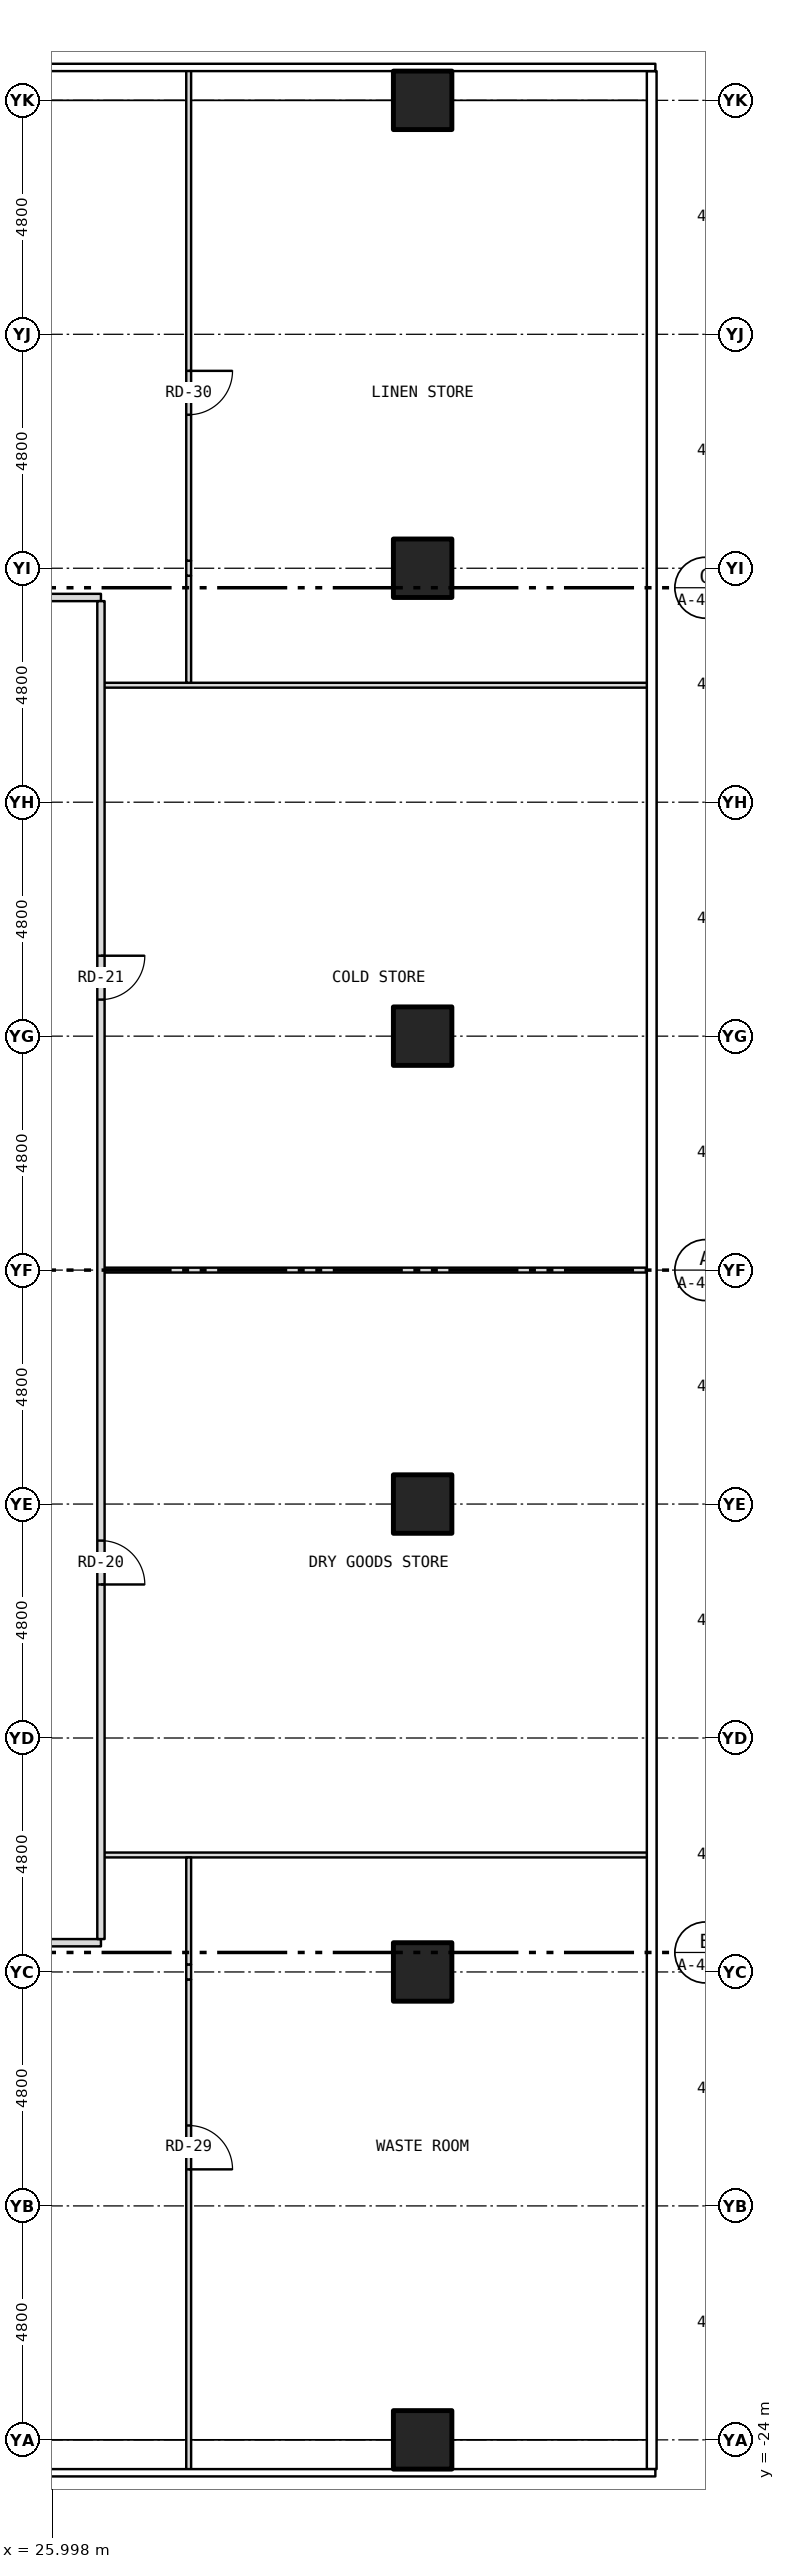
"""IFC4 building model, lengths in metres.
Left out: names, types, materials, properties, quantities, classifications, styles, units other than length and angle.
Written with IfcOpenShell. Run it as: python <this file> out.ifc"""

import sys

from ifc_helpers import new_model, si_unit, direction, frame, frame_2d, origin, origin_2d, place, context, subcontext, project, spatial, rectangle, hollow_rectangle, extrude, element, fill, save


model = new_model("IFC4")
c1 = context("Model", 3, precision=1e-05, world=origin(), true_north=direction((0.0, 1.0)))
c2 = subcontext(c1, "Body", "Model", "MODEL_VIEW")
j1 = project(units=[si_unit("LENGTHUNIT", "METRE"), si_unit("PLANEANGLEUNIT", "RADIAN")], contexts=[c1])
p1 = place(None, origin())
s1 = spatial("IfcSite", under=j1, at=p1, CompositionType="ELEMENT")
p2 = place(p1, origin())
s2 = spatial("IfcBuilding", under=s1, at=p2, CompositionType="ELEMENT")
p3 = place(p2, frame((0.0, 0.0, 29.0)))
s3 = spatial("IfcBuildingStorey", under=s2, at=p3, CompositionType="ELEMENT", Elevation=29.0)
for number, where, z_axis, x_axis in (
    (1, (33.6, -24.0, -0.2), (0.0, 0.0, 1.0), (1.0, 0.0, 0.0)),
    (2, (33.6, -14.4, -0.2), (0.0, 0.0, 1.0), (1.0, 0.0, 0.0)),
    (3, (33.6, -4.8, -0.2), (0.0, 0.0, 1.0), (1.0, 0.0, 0.0)),
    (4, (33.6, 4.8, -0.2), (0.0, 0.0, 1.0), (1.0, 0.0, 0.0)),
    (5, (33.6, 14.4, -0.2), (0.0, 0.0, 1.0), (1.0, 0.0, 0.0)),
    (6, (33.6, 24.0, -0.2), (0.0, 0.0, 1.0), (1.0, 0.0, 0.0)),
):
    element("IfcColumn", number, at=place(p3, frame(where, z_axis=z_axis, x_axis=x_axis)), inside=s3, PredefinedType="COLUMN", context=c2, shape_type="SweptSolid", body=[
        extrude(hollow_rectangle(XDim=1.2, YDim=1.2, WallThickness=0.07, at=origin_2d()), origin(), (0.0, 0.0, 1.0), 4.4),
    ])
p4 = place(p3, frame((-27.0, -13.8, 0.0), z_axis=(0.0, 0.0, 1.0), x_axis=(1.0, 0.0, 0.0)))
e7 = element("IfcWall", 7, at=p4, inside=s3, PredefinedType="PARTITIONING", context=c2, shape_type="SweptSolid", body=[
    extrude(rectangle(XDim=54.0, YDim=0.15, at=frame_2d((27.0, 0.0))), origin(), (0.0, 0.0, 1.0), 4.2),
])
p5 = place(p4, frame((37.83, 0.0, 0.0)))
e8 = element("IfcOpeningElement", 8, at=p5, cuts=e7, PredefinedType="OPENING", context=c2, shape_type="SweptSolid", body=[
    extrude(rectangle(XDim=0.9, YDim=2.1, at=frame_2d((0.45, 1.05))), frame((0.0, 0.087, 0.0), z_axis=(0.0, -1.0, 0.0), x_axis=(1.0, 0.0, 0.0)), (0.0, 0.0, 1.0), 0.174),
])
p6 = place(p4, frame((39.88, 0.0, 0.0)))
e9 = element("IfcOpeningElement", 9, at=p6, cuts=e7, PredefinedType="OPENING", context=c2, shape_type="SweptSolid", body=[
    extrude(rectangle(XDim=0.9, YDim=2.1, at=frame_2d((0.45, 1.05))), frame((0.0, 0.087, 0.0), z_axis=(0.0, -1.0, 0.0), x_axis=(1.0, 0.0, 0.0)), (0.0, 0.0, 1.0), 0.174),
])
p7 = place(p4, frame((43.75, 0.0, 0.0)))
e10 = element("IfcOpeningElement", 10, at=p7, cuts=e7, PredefinedType="OPENING", context=c2, shape_type="SweptSolid", body=[
    extrude(rectangle(XDim=0.9, YDim=2.1, at=frame_2d((0.45, 1.05))), frame((0.0, 0.087, 0.0), z_axis=(0.0, -1.0, 0.0), x_axis=(1.0, 0.0, 0.0)), (0.0, 0.0, 1.0), 0.174),
])
p8 = place(p4, frame((9.801, 0.0, 0.0)))
e11 = element("IfcOpeningElement", 11, at=p8, cuts=e7, PredefinedType="OPENING", context=c2, shape_type="SweptSolid", body=[
    extrude(rectangle(XDim=0.9, YDim=2.1, at=frame_2d((0.45, 1.05))), frame((0.0, 0.087, 0.0), z_axis=(0.0, -1.0, 0.0), x_axis=(1.0, 0.0, 0.0)), (0.0, 0.0, 1.0), 0.174),
])
p9 = place(p4, frame((14.601, 0.0, 0.0)))
e12 = element("IfcOpeningElement", 12, at=p9, cuts=e7, PredefinedType="OPENING", context=c2, shape_type="SweptSolid", body=[
    extrude(rectangle(XDim=0.9, YDim=2.1, at=frame_2d((0.45, 1.05))), frame((0.0, 0.087, 0.0), z_axis=(0.0, -1.0, 0.0), x_axis=(1.0, 0.0, 0.0)), (0.0, 0.0, 1.0), 0.174),
])
p10 = place(p4, frame((20.095, 0.0, 0.0)))
e13 = element("IfcOpeningElement", 13, at=p10, cuts=e7, PredefinedType="OPENING", context=c2, shape_type="SweptSolid", body=[
    extrude(rectangle(XDim=0.9, YDim=2.1, at=frame_2d((0.45, 1.05))), frame((0.0, 0.087, 0.0), z_axis=(0.0, -1.0, 0.0), x_axis=(1.0, 0.0, 0.0)), (0.0, 0.0, 1.0), 0.174),
])
p11 = place(p4, frame((24.303, 0.0, 0.0)))
e14 = element("IfcOpeningElement", 14, at=p11, cuts=e7, PredefinedType="OPENING", context=c2, shape_type="SweptSolid", body=[
    extrude(rectangle(XDim=0.9, YDim=2.1, at=frame_2d((0.45, 1.05))), frame((0.0, 0.087, 0.0), z_axis=(0.0, -1.0, 0.0), x_axis=(1.0, 0.0, 0.0)), (0.0, 0.0, 1.0), 0.174),
])
p12 = place(p4, frame((3.75, 0.0, 0.0)))
e15 = element("IfcOpeningElement", 15, at=p12, cuts=e7, PredefinedType="OPENING", context=c2, shape_type="SweptSolid", body=[
    extrude(rectangle(XDim=0.9, YDim=2.1, at=frame_2d((0.45, 1.05))), frame((0.0, 0.087, 0.0), z_axis=(0.0, -1.0, 0.0), x_axis=(1.0, 0.0, 0.0)), (0.0, 0.0, 1.0), 0.174),
])
p13 = place(p4, frame((49.35, 0.0, 0.0)))
e16 = element("IfcOpeningElement", 16, at=p13, cuts=e7, PredefinedType="OPENING", context=c2, shape_type="SweptSolid", body=[
    extrude(rectangle(XDim=0.9, YDim=2.1, at=frame_2d((0.45, 1.05))), frame((0.0, 0.087, 0.0), z_axis=(0.0, -1.0, 0.0), x_axis=(1.0, 0.0, 0.0)), (0.0, 0.0, 1.0), 0.174),
])
p14 = place(p4, frame((32.454, 0.0, 0.0)))
e17 = element("IfcOpeningElement", 17, at=p14, cuts=e7, PredefinedType="OPENING", context=c2, shape_type="SweptSolid", body=[
    extrude(rectangle(XDim=0.9, YDim=2.1, at=frame_2d((0.45, 1.05))), frame((0.0, 0.087, 0.0), z_axis=(0.0, -1.0, 0.0), x_axis=(1.0, 0.0, 0.0)), (0.0, 0.0, 1.0), 0.174),
])
for number, where, z_axis, x_axis in (
    (18, (27.0, -12.0, 0.0), (0.0, 0.0, 1.0), (1.0, 0.0, 0.0)),
    (19, (27.0, 0.0, 0.0), (0.0, 0.0, 1.0), (1.0, 0.0, 0.0)),
    (20, (27.0, 12.0, 0.0), (0.0, 0.0, 1.0), (1.0, 0.0, 0.0)),
):
    element("IfcWall", number, at=place(p3, frame(where, z_axis=z_axis, x_axis=x_axis)), inside=s3, PredefinedType="PARTITIONING", context=c2, shape_type="SweptSolid", body=[
        extrude(rectangle(XDim=11.28, YDim=0.1, at=frame_2d((5.64, 0.0))), origin(), (0.0, 0.0, 1.0), 4.2),
    ])
p15 = place(p3, frame((-27.0, 13.8, 0.0), z_axis=(0.0, 0.0, 1.0), x_axis=(1.0, 0.0, 0.0)))
e21 = element("IfcWall", 21, at=p15, inside=s3, PredefinedType="PARTITIONING", context=c2, shape_type="SweptSolid", body=[
    extrude(rectangle(XDim=54.0, YDim=0.15, at=frame_2d((27.0, 0.0))), origin(), (0.0, 0.0, 1.0), 4.2),
])
p16 = place(p15, frame((42.15, 0.0, 0.0)))
e22 = element("IfcOpeningElement", 22, at=p16, cuts=e21, PredefinedType="OPENING", context=c2, shape_type="SweptSolid", body=[
    extrude(rectangle(XDim=0.9, YDim=2.1, at=frame_2d((0.45, 1.05))), frame((0.0, 0.087, 0.0), z_axis=(0.0, -1.0, 0.0), x_axis=(1.0, 0.0, 0.0)), (0.0, 0.0, 1.0), 0.174),
])
p17 = place(p15, frame((3.75, 0.0, 0.0)))
e23 = element("IfcOpeningElement", 23, at=p17, cuts=e21, PredefinedType="OPENING", context=c2, shape_type="SweptSolid", body=[
    extrude(rectangle(XDim=0.9, YDim=2.1, at=frame_2d((0.45, 1.05))), frame((0.0, 0.087, 0.0), z_axis=(0.0, -1.0, 0.0), x_axis=(1.0, 0.0, 0.0)), (0.0, 0.0, 1.0), 0.174),
])
p18 = place(p15, frame((49.35, 0.0, 0.0)))
e24 = element("IfcOpeningElement", 24, at=p18, cuts=e21, PredefinedType="OPENING", context=c2, shape_type="SweptSolid", body=[
    extrude(rectangle(XDim=0.9, YDim=2.1, at=frame_2d((0.45, 1.05))), frame((0.0, 0.087, 0.0), z_axis=(0.0, -1.0, 0.0), x_axis=(1.0, 0.0, 0.0)), (0.0, 0.0, 1.0), 0.174),
])
p19 = place(p15, frame((13.35, 0.0, 0.0)))
e25 = element("IfcOpeningElement", 25, at=p19, cuts=e21, PredefinedType="OPENING", context=c2, shape_type="SweptSolid", body=[
    extrude(rectangle(XDim=0.9, YDim=2.1, at=frame_2d((0.45, 1.05))), frame((0.0, 0.087, 0.0), z_axis=(0.0, -1.0, 0.0), x_axis=(1.0, 0.0, 0.0)), (0.0, 0.0, 1.0), 0.174),
])
p20 = place(p15, frame((32.55, 0.0, 0.0)))
e26 = element("IfcOpeningElement", 26, at=p20, cuts=e21, PredefinedType="OPENING", context=c2, shape_type="SweptSolid", body=[
    extrude(rectangle(XDim=0.9, YDim=2.1, at=frame_2d((0.45, 1.05))), frame((0.0, 0.087, 0.0), z_axis=(0.0, -1.0, 0.0), x_axis=(1.0, 0.0, 0.0)), (0.0, 0.0, 1.0), 0.174),
])
p21 = place(p3, frame((27.0, -13.725, 0.0), z_axis=(0.0, 0.0, 1.0), x_axis=(0.0, 1.0, 0.0)))
e27 = element("IfcWall", 27, at=p21, inside=s3, PredefinedType="PARTITIONING", context=c2, shape_type="SweptSolid", body=[
    extrude(rectangle(XDim=27.45, YDim=0.15, at=frame_2d((13.725, 0.0))), origin(), (0.0, 0.0, 1.0), 4.2),
])
p22 = place(p21, frame((7.275, 0.0, 0.0)))
e28 = element("IfcOpeningElement", 28, at=p22, cuts=e27, PredefinedType="OPENING", context=c2, shape_type="SweptSolid", body=[
    extrude(rectangle(XDim=0.9, YDim=2.1, at=frame_2d((0.45, 1.05))), frame((0.0, 0.087, 0.0), z_axis=(0.0, -1.0, 0.0), x_axis=(1.0, 0.0, 0.0)), (0.0, 0.0, 1.0), 0.174),
])
p23 = place(p21, frame((19.275, 0.0, 0.0)))
e29 = element("IfcOpeningElement", 29, at=p23, cuts=e27, PredefinedType="OPENING", context=c2, shape_type="SweptSolid", body=[
    extrude(rectangle(XDim=0.9, YDim=2.1, at=frame_2d((0.45, 1.05))), frame((0.0, 0.087, 0.0), z_axis=(0.0, -1.0, 0.0), x_axis=(1.0, 0.0, 0.0)), (0.0, 0.0, 1.0), 0.174),
])
p24 = place(p3, frame((28.8, -24.63, 0.0), z_axis=(0.0, 0.0, 1.0), x_axis=(0.0, 1.0, 0.0)))
e30 = element("IfcWall", 30, at=p24, inside=s3, PredefinedType="PARTITIONING", context=c2, shape_type="SweptSolid", body=[
    extrude(rectangle(XDim=10.076, YDim=0.1, at=frame_2d((5.038, 0.0))), origin(), (0.0, 0.0, 1.0), 3.583),
])
p25 = place(p24, frame((6.18, 0.0, 0.0)))
e31 = element("IfcOpeningElement", 31, at=p25, cuts=e30, PredefinedType="OPENING", context=c2, shape_type="SweptSolid", body=[
    extrude(rectangle(XDim=0.9, YDim=2.1, at=frame_2d((0.45, 1.05))), frame((0.0, 0.062, 0.0), z_axis=(0.0, -1.0, 0.0), x_axis=(1.0, 0.0, 0.0)), (0.0, 0.0, 1.0), 0.124),
])
p26 = place(p3, frame((28.8, -14.554, 0.0), z_axis=(0.0, 0.0, 1.0), x_axis=(0.0, 1.0, 0.0)))
e32 = element("IfcWall", 32, at=p26, inside=s3, PredefinedType="PARTITIONING", context=c2, shape_type="SweptSolid", body=[
    extrude(rectangle(XDim=0.308, YDim=0.1, at=frame_2d((0.154, 0.0))), origin(), (0.0, 0.0, 1.0), 4.2),
])
for number, where, z_axis, x_axis in (
    (33, (28.8, -14.246, 0.0), (0.0, 0.0, 1.0), (0.0, 1.0, 0.0)),
    (34, (28.8, 12.05, 0.0), (0.0, 0.0, 1.0), (0.0, 1.0, 0.0)),
):
    element("IfcWall", number, at=place(p3, frame(where, z_axis=z_axis, x_axis=x_axis)), inside=s3, PredefinedType="PARTITIONING", context=c2, shape_type="SweptSolid", body=[
        extrude(rectangle(XDim=2.196, YDim=0.1, at=frame_2d((1.098, 0.0))), origin(), (0.0, 0.0, 1.0), 3.583),
    ])
p27 = place(p3, frame((28.8, 14.246, 0.0), z_axis=(0.0, 0.0, 1.0), x_axis=(0.0, 1.0, 0.0)))
e35 = element("IfcWall", 35, at=p27, inside=s3, PredefinedType="PARTITIONING", context=c2, shape_type="SweptSolid", body=[
    extrude(rectangle(XDim=0.308, YDim=0.1, at=frame_2d((0.154, 0.0))), origin(), (0.0, 0.0, 1.0), 4.2),
])
p28 = place(p3, frame((28.8, 14.554, 0.0), z_axis=(0.0, 0.0, 1.0), x_axis=(0.0, 1.0, 0.0)))
e36 = element("IfcWall", 36, at=p28, inside=s3, PredefinedType="PARTITIONING", context=c2, shape_type="SweptSolid", body=[
    extrude(rectangle(XDim=10.076, YDim=0.1, at=frame_2d((5.038, 0.0))), origin(), (0.0, 0.0, 1.0), 3.583),
])
p29 = place(p28, frame((2.996, 0.0, 0.0)))
e37 = element("IfcOpeningElement", 37, at=p29, cuts=e36, PredefinedType="OPENING", context=c2, shape_type="SweptSolid", body=[
    extrude(rectangle(XDim=0.9, YDim=2.1, at=frame_2d((0.45, 1.05))), frame((0.0, 0.062, 0.0), z_axis=(0.0, -1.0, 0.0), x_axis=(1.0, 0.0, 0.0)), (0.0, 0.0, 1.0), 0.124),
])
p30 = place(p22, origin())
e38 = element("IfcDoor", 38, at=p30, inside=s3, OperationType="SINGLE_SWING_LEFT", PredefinedType="DOOR", context=c2, shape_type="SweptSolid", body=[
    extrude(rectangle(XDim=0.9, YDim=2.1, at=frame_2d((0.45, 1.05))), frame((0.0, 0.025, 0.0), z_axis=(0.0, -1.0, 0.0), x_axis=(1.0, 0.0, 0.0)), (0.0, 0.0, 1.0), 0.05),
])
fill(e28, e38)
p31 = place(p23, origin())
e39 = element("IfcDoor", 39, at=p31, inside=s3, OperationType="SINGLE_SWING_RIGHT", PredefinedType="DOOR", context=c2, shape_type="SweptSolid", body=[
    extrude(rectangle(XDim=0.9, YDim=2.1, at=frame_2d((0.45, 1.05))), frame((0.0, 0.025, 0.0), z_axis=(0.0, -1.0, 0.0), x_axis=(1.0, 0.0, 0.0)), (0.0, 0.0, 1.0), 0.05),
])
fill(e29, e39)
p32 = place(p25, origin())
e40 = element("IfcDoor", 40, at=p32, inside=s3, OperationType="SINGLE_SWING_LEFT", PredefinedType="DOOR", context=c2, shape_type="SweptSolid", body=[
    extrude(rectangle(XDim=0.9, YDim=2.1, at=frame_2d((0.45, 1.05))), frame((0.0, 0.025, 0.0), z_axis=(0.0, -1.0, 0.0), x_axis=(1.0, 0.0, 0.0)), (0.0, 0.0, 1.0), 0.05),
])
fill(e31, e40)
p33 = place(p29, origin())
e41 = element("IfcDoor", 41, at=p33, inside=s3, OperationType="SINGLE_SWING_RIGHT", PredefinedType="DOOR", context=c2, shape_type="SweptSolid", body=[
    extrude(rectangle(XDim=0.9, YDim=2.1, at=frame_2d((0.45, 1.05))), frame((0.0, 0.025, 0.0), z_axis=(0.0, -1.0, 0.0), x_axis=(1.0, 0.0, 0.0)), (0.0, 0.0, 1.0), 0.05),
])
fill(e37, e41)
save(model, sys.argv[1])
